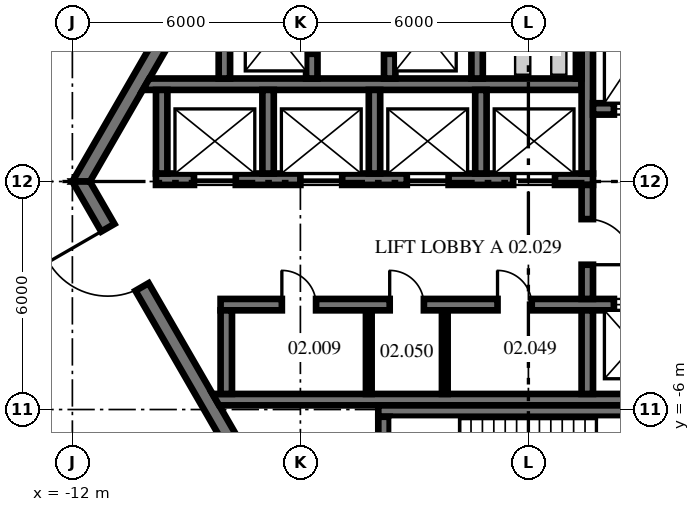
"""IFC4 building model, lengths in metres.
Left out: names, types, materials, properties, quantities, classifications, styles, units other than length and angle.
Written with IfcOpenShell. Run it as: python <this file> out.ifc"""

import sys

from ifc_helpers import new_model, si_unit, direction, frame, frame_2d, origin, place, context, subcontext, project, spatial, polyline, rectangle, outline, extrude, source, transform, mapped, element, fill, save


model = new_model("IFC4")
c1 = context("Model", 3, precision=1e-05, world=origin(), true_north=direction((0.0, 1.0)))
c2 = subcontext(c1, "Body", "Model", "MODEL_VIEW")
j1 = project(units=[si_unit("LENGTHUNIT", "METRE"), si_unit("PLANEANGLEUNIT", "RADIAN")], contexts=[c1])
p1 = place(None, origin())
s1 = spatial("IfcSite", under=j1, at=p1, CompositionType="ELEMENT")
p2 = place(p1, origin())
s2 = spatial("IfcBuilding", under=s1, at=p2, CompositionType="ELEMENT")
p3 = place(p2, frame((0.0, 0.0, 11.5)))
s3 = spatial("IfcBuildingStorey", under=s2, at=p3, CompositionType="ELEMENT", Elevation=11.5)
m1 = source(origin(), c2, "Body", "SweptSolid", [
    extrude(outline(polyline([(-0.115, -0.2), (11.885, -0.2), (11.654, 0.2), (0.115, 0.2), (-0.115, -0.2)])), origin(), (0.0, 0.0, 1.0), 4.3),
])
p4 = place(p3, frame((-5.885, 10.192, 0.0), z_axis=(0.0, 0.0, 1.0), x_axis=(-0.499996592174, -0.866027371285, 0.0)))
e1 = element("IfcWall", 1, at=p4, inside=s3, PredefinedType="SHEAR", context=c2, shape_type="MappedRepresentation", body=[
    mapped(m1, transform((0.0, 0.0, 0.0), scale=1.0)),
])
p5 = place(p4, frame((3.185, 0.0, 0.0)))
e2 = element("IfcOpeningElement", 2, at=p5, cuts=e1, PredefinedType="OPENING", context=c2, shape_type="SweptSolid", body=[
    extrude(rectangle(XDim=1.2, YDim=2.1, at=frame_2d((0.6, 1.05))), frame((0.0, 0.21, 0.0), z_axis=(0.0, -1.0, 0.0), x_axis=(1.0, 0.0, 0.0)), (0.0, 0.0, 1.0), 0.42),
])
p6 = place(p3, frame((-11.769, 0.0, 0.0), z_axis=(0.0, 0.0, 1.0), x_axis=(0.499996592174, -0.866027371285, 0.0)))
e3 = element("IfcWall", 3, at=p6, inside=s3, PredefinedType="SHEAR", context=c2, shape_type="MappedRepresentation", body=[
    mapped(m1, transform((0.0, 0.0, 0.0), scale=1.0)),
])
p7 = place(p6, frame((1.405, 0.0, 0.0)))
e4 = element("IfcOpeningElement", 4, at=p7, cuts=e3, PredefinedType="OPENING", context=c2, shape_type="SweptSolid", body=[
    extrude(rectangle(XDim=1.8, YDim=2.1, at=frame_2d((0.9, 1.05))), frame((0.0, 0.21, 0.0), z_axis=(0.0, -1.0, 0.0), x_axis=(1.0, 0.0, 0.0)), (0.0, 0.0, 1.0), 0.42),
])
p8 = place(p6, frame((7.915, 0.0, 0.0)))
e5 = element("IfcOpeningElement", 5, at=p8, cuts=e3, PredefinedType="OPENING", context=c2, shape_type="SweptSolid", body=[
    extrude(rectangle(XDim=1.2, YDim=2.1, at=frame_2d((0.6, 1.05))), frame((0.0, 0.21, 0.0), z_axis=(0.0, -1.0, 0.0), x_axis=(1.0, 0.0, 0.0)), (0.0, 0.0, 1.0), 0.42),
])
m2 = source(origin(), c2, "Body", "SweptSolid", [
    extrude(rectangle(XDim=11.5, YDim=0.3, at=frame_2d((5.75, 0.0))), origin(), (0.0, 0.0, 1.0), 4.3),
])
p9 = place(p3, frame((-9.8, 0.06, 0.0), z_axis=(0.0, 0.0, 1.0), x_axis=(1.0, 0.0, 0.0)))
e6 = element("IfcWall", 6, at=p9, inside=s3, PredefinedType="SHEAR", context=c2, shape_type="MappedRepresentation", body=[
    mapped(m2, transform((0.0, 0.0, 0.0), scale=1.0)),
])
p10 = place(p9, frame((1.0, 0.0, 0.0)))
e7 = element("IfcOpeningElement", 7, at=p10, cuts=e6, PredefinedType="OPENING", context=c2, shape_type="SweptSolid", body=[
    extrude(rectangle(XDim=1.1, YDim=2.1, at=frame_2d((0.55, 1.05))), frame((0.0, 0.16, 0.0), z_axis=(0.0, -1.0, 0.0), x_axis=(1.0, 0.0, 0.0)), (0.0, 0.0, 1.0), 0.32),
])
p11 = place(p9, frame((3.8, 0.0, 0.0)))
e8 = element("IfcOpeningElement", 8, at=p11, cuts=e6, PredefinedType="OPENING", context=c2, shape_type="SweptSolid", body=[
    extrude(rectangle(XDim=1.1, YDim=2.1, at=frame_2d((0.55, 1.05))), frame((0.0, 0.16, 0.0), z_axis=(0.0, -1.0, 0.0), x_axis=(1.0, 0.0, 0.0)), (0.0, 0.0, 1.0), 0.32),
])
p12 = place(p9, frame((6.6, 0.0, 0.0)))
e9 = element("IfcOpeningElement", 9, at=p12, cuts=e6, PredefinedType="OPENING", context=c2, shape_type="SweptSolid", body=[
    extrude(rectangle(XDim=1.1, YDim=2.1, at=frame_2d((0.55, 1.05))), frame((0.0, 0.16, 0.0), z_axis=(0.0, -1.0, 0.0), x_axis=(1.0, 0.0, 0.0)), (0.0, 0.0, 1.0), 0.32),
])
p13 = place(p9, frame((9.4, 0.0, 0.0)))
e10 = element("IfcOpeningElement", 10, at=p13, cuts=e6, PredefinedType="OPENING", context=c2, shape_type="SweptSolid", body=[
    extrude(rectangle(XDim=1.1, YDim=2.1, at=frame_2d((0.55, 1.05))), frame((0.0, 0.16, 0.0), z_axis=(0.0, -1.0, 0.0), x_axis=(1.0, 0.0, 0.0)), (0.0, 0.0, 1.0), 0.32),
])
m3 = source(origin(), c2, "Body", "SweptSolid", [
    extrude(outline(polyline([(11.2, -0.15), (-0.349, -0.15), (-0.176, 0.15), (11.2, 0.15), (11.2, -0.15)])), origin(), (0.0, 0.0, 1.0), 4.3),
])
p14 = place(p3, frame((-9.8, 2.56, 0.0), z_axis=(0.0, 0.0, 1.0), x_axis=(1.0, 0.0, 0.0)))
e11 = element("IfcWall", 11, at=p14, inside=s3, PredefinedType="SHEAR", context=c2, shape_type="MappedRepresentation", body=[
    mapped(m3, transform((0.0, 0.0, 0.0), scale=1.0)),
])
m4 = source(origin(), c2, "Body", "SweptSolid", [
    extrude(rectangle(XDim=4.45, YDim=0.3, at=frame_2d((2.225, 0.0))), origin(), (0.0, 0.0, 1.0), 4.3),
])
p15 = place(p3, frame((1.55, 0.21, 0.0), z_axis=(0.0, 0.0, 1.0), x_axis=(0.0, 1.0, 0.0)))
e12 = element("IfcWall", 12, at=p15, inside=s3, PredefinedType="SHEAR", context=c2, shape_type="MappedRepresentation", body=[
    mapped(m4, transform((0.0, 0.0, 0.0), scale=1.0)),
])
m5 = source(origin(), c2, "Body", "SweptSolid", [
    extrude(rectangle(XDim=3.0, YDim=0.3, at=frame_2d((1.5, 0.0))), origin(), (0.0, 0.0, 1.0), 4.3),
])
p16 = place(p3, frame((1.7, 1.91, 0.0), z_axis=(0.0, 0.0, 1.0), x_axis=(1.0, 0.0, 0.0)))
e13 = element("IfcWall", 13, at=p16, inside=s3, PredefinedType="SHEAR", context=c2, shape_type="MappedRepresentation", body=[
    mapped(m5, transform((0.0, 0.0, 0.0), scale=1.0)),
])
p17 = place(p16, frame((0.55, 0.0, 0.0)))
e14 = element("IfcOpeningElement", 14, at=p17, cuts=e13, PredefinedType="OPENING", context=c2, shape_type="SweptSolid", body=[
    extrude(rectangle(XDim=1.1, YDim=2.1, at=frame_2d((0.55, 1.05))), frame((0.0, 0.16, 0.0), z_axis=(0.0, -1.0, 0.0), x_axis=(1.0, 0.0, 0.0)), (0.0, 0.0, 1.0), 0.32),
])
m6 = source(origin(), c2, "Body", "SweptSolid", [
    extrude(rectangle(XDim=12.8, YDim=0.3, at=frame_2d((6.4, 0.0))), origin(), (0.0, 0.0, 1.0), 4.3),
])
p18 = place(p3, frame((-8.1, -3.24, 0.0), z_axis=(0.0, 0.0, 1.0), x_axis=(1.0, 0.0, 0.0)))
e15 = element("IfcWall", 15, at=p18, inside=s3, PredefinedType="SHEAR", context=c2, shape_type="MappedRepresentation", body=[
    mapped(m6, transform((0.0, 0.0, 0.0), scale=1.0)),
])
p19 = place(p18, frame((1.613, 0.0, 0.0)))
e16 = element("IfcOpeningElement", 16, at=p19, cuts=e15, PredefinedType="OPENING", context=c2, shape_type="SweptSolid", body=[
    extrude(rectangle(XDim=0.9, YDim=2.1, at=frame_2d((0.45, 1.05))), frame((0.0, 0.16, 0.0), z_axis=(0.0, -1.0, 0.0), x_axis=(1.0, 0.0, 0.0)), (0.0, 0.0, 1.0), 0.32),
])
p20 = place(p18, frame((4.45, 0.0, 0.0)))
e17 = element("IfcOpeningElement", 17, at=p20, cuts=e15, PredefinedType="OPENING", context=c2, shape_type="SweptSolid", body=[
    extrude(rectangle(XDim=0.9, YDim=2.1, at=frame_2d((0.45, 1.05))), frame((0.0, 0.16, 0.0), z_axis=(0.0, -1.0, 0.0), x_axis=(1.0, 0.0, 0.0)), (0.0, 0.0, 1.0), 0.32),
])
p21 = place(p18, frame((7.288, 0.0, 0.0)))
e18 = element("IfcOpeningElement", 18, at=p21, cuts=e15, PredefinedType="OPENING", context=c2, shape_type="SweptSolid", body=[
    extrude(rectangle(XDim=0.9, YDim=2.1, at=frame_2d((0.45, 1.05))), frame((0.0, 0.16, 0.0), z_axis=(0.0, -1.0, 0.0), x_axis=(1.0, 0.0, 0.0)), (0.0, 0.0, 1.0), 0.32),
])
p22 = place(p18, frame((10.35, 0.0, 0.0)))
e19 = element("IfcOpeningElement", 19, at=p22, cuts=e15, PredefinedType="OPENING", context=c2, shape_type="SweptSolid", body=[
    extrude(rectangle(XDim=1.1, YDim=2.1, at=frame_2d((0.55, 1.05))), frame((0.0, 0.16, 0.0), z_axis=(0.0, -1.0, 0.0), x_axis=(1.0, 0.0, 0.0)), (0.0, 0.0, 1.0), 0.32),
])
m7 = source(origin(), c2, "Body", "SweptSolid", [
    extrude(outline(polyline([(12.0, -0.15), (-0.04, -0.15), (-0.213, 0.15), (12.0, 0.15), (12.0, -0.15)])), origin(), (0.0, 0.0, 1.0), 4.3),
])
p23 = place(p3, frame((-8.1, -5.74, 0.0), z_axis=(0.0, 0.0, 1.0), x_axis=(1.0, 0.0, 0.0)))
e20 = element("IfcWall", 20, at=p23, inside=s3, PredefinedType="SHEAR", context=c2, shape_type="MappedRepresentation", body=[
    mapped(m7, transform((0.0, 0.0, 0.0), scale=1.0)),
])
m8 = source(origin(), c2, "Body", "SweptSolid", [
    extrude(rectangle(XDim=2.2, YDim=0.3, at=frame_2d((1.1, 0.0))), origin(), (0.0, 0.0, 1.0), 4.3),
])
p24 = place(p3, frame((-7.95, -5.59, 0.0), z_axis=(0.0, 0.0, 1.0), x_axis=(0.0, 1.0, 0.0)))
e21 = element("IfcWall", 21, at=p24, inside=s3, PredefinedType="SHEAR", context=c2, shape_type="MappedRepresentation", body=[
    mapped(m8, transform((0.0, 0.0, 0.0), scale=1.0)),
])
m9 = source(origin(), c2, "Body", "SweptSolid", [
    extrude(rectangle(XDim=2.2, YDim=0.3, at=frame_2d((1.1, 0.0))), origin(), (0.0, 0.0, 1.0), 4.3),
])
p25 = place(p3, frame((-9.65, 0.21, 0.0), z_axis=(0.0, 0.0, 1.0), x_axis=(0.0, 1.0, 0.0)))
e22 = element("IfcWall", 22, at=p25, inside=s3, PredefinedType="SHEAR", context=c2, shape_type="MappedRepresentation", body=[
    mapped(m9, transform((0.0, 0.0, 0.0), scale=1.0)),
])
p26 = place(p3, frame((1.55, -5.59, 0.0), z_axis=(0.0, 0.0, 1.0), x_axis=(0.0, 1.0, 0.0)))
e23 = element("IfcWall", 23, at=p26, inside=s3, PredefinedType="SHEAR", context=c2, shape_type="MappedRepresentation", body=[
    mapped(m8, transform((0.0, 0.0, 0.0), scale=1.0)),
])
p27 = place(p3, frame((1.55, -3.09, 0.0), z_axis=(0.0, 0.0, 1.0), x_axis=(0.0, 1.0, 0.0)))
e24 = element("IfcWall", 24, at=p27, inside=s3, PredefinedType="SHEAR", context=c2, shape_type="MappedRepresentation", body=[
    mapped(m5, transform((0.0, 0.0, 0.0), scale=1.0)),
])
p28 = place(p27, frame((0.9, 0.0, 0.0)))
e25 = element("IfcOpeningElement", 25, at=p28, cuts=e24, PredefinedType="OPENING", context=c2, shape_type="SweptSolid", body=[
    extrude(rectangle(XDim=1.2, YDim=2.1, at=frame_2d((0.6, 1.05))), frame((0.0, 0.16, 0.0), z_axis=(0.0, -1.0, 0.0), x_axis=(1.0, 0.0, 0.0)), (0.0, 0.0, 1.0), 0.32),
])
m10 = source(origin(), c2, "Body", "SweptSolid", [
    extrude(outline(polyline([(0.0, -0.15), (8.95, -0.15), (8.65, 0.15), (0.0, 0.15), (0.0, -0.15)])), origin(), (0.0, 0.0, 1.0), 4.3),
])
p29 = place(p3, frame((-3.95, -6.04, 0.0), z_axis=(0.0, 0.0, 1.0), x_axis=(1.0, 0.0, 0.0)))
e26 = element("IfcWall", 26, at=p29, inside=s3, PredefinedType="SHEAR", context=c2, shape_type="MappedRepresentation", body=[
    mapped(m10, transform((0.0, 0.0, 0.0), scale=1.0)),
])
m11 = source(origin(), c2, "Body", "SweptSolid", [
    extrude(outline(polyline([(3.8, -0.15), (-0.004, -0.15), (-0.004, 0.15), (3.8, 0.15), (3.8, -0.15)])), origin(), (0.0, 0.0, 1.0), 4.3),
])
p30 = place(p3, frame((-3.8, -9.99, 0.0), z_axis=(0.0, 0.0, 1.0), x_axis=(0.0, 1.0, 0.0)))
e27 = element("IfcWall", 27, at=p30, inside=s3, PredefinedType="SHEAR", context=c2, shape_type="MappedRepresentation", body=[
    mapped(m11, transform((0.0, 0.0, 0.0), scale=1.0)),
])
m12 = source(origin(), c2, "Body", "SweptSolid", [
    extrude(rectangle(XDim=2.4, YDim=0.3, at=frame_2d((1.2, 0.0))), origin(), (0.0, 0.0, 1.0), 4.3),
])
p31 = place(p3, frame((-8.0, 2.71, 0.0), z_axis=(0.0, 0.0, 1.0), x_axis=(0.0, 1.0, 0.0)))
e28 = element("IfcWall", 28, at=p31, inside=s3, PredefinedType="SHEAR", context=c2, shape_type="MappedRepresentation", body=[
    mapped(m12, transform((0.0, 0.0, 0.0), scale=1.0)),
])
p32 = place(p3, frame((-5.7, 2.71, 0.0), z_axis=(0.0, 0.0, 1.0), x_axis=(0.0, 1.0, 0.0)))
e29 = element("IfcWall", 29, at=p32, inside=s3, PredefinedType="SHEAR", context=c2, shape_type="MappedRepresentation", body=[
    mapped(m12, transform((0.0, 0.0, 0.0), scale=1.0)),
])
p33 = place(p32, frame((0.65, 0.0, 0.0)))
e30 = element("IfcOpeningElement", 30, at=p33, cuts=e29, PredefinedType="OPENING", context=c2, shape_type="SweptSolid", body=[
    extrude(rectangle(XDim=1.1, YDim=2.1, at=frame_2d((0.55, 1.05))), frame((0.0, 0.16, 0.0), z_axis=(0.0, -1.0, 0.0), x_axis=(1.0, 0.0, 0.0)), (0.0, 0.0, 1.0), 0.32),
])
p34 = place(p3, frame((-3.65, 2.71, 0.0), z_axis=(0.0, 0.0, 1.0), x_axis=(0.0, 1.0, 0.0)))
e31 = element("IfcWall", 31, at=p34, inside=s3, PredefinedType="SHEAR", context=c2, shape_type="MappedRepresentation", body=[
    mapped(m12, transform((0.0, 0.0, 0.0), scale=1.0)),
])
p35 = place(p34, frame((0.65, 0.0, 0.0)))
e32 = element("IfcOpeningElement", 32, at=p35, cuts=e31, PredefinedType="OPENING", context=c2, shape_type="SweptSolid", body=[
    extrude(rectangle(XDim=1.1, YDim=2.1, at=frame_2d((0.55, 1.05))), frame((0.0, 0.16, 0.0), z_axis=(0.0, -1.0, 0.0), x_axis=(1.0, 0.0, 0.0)), (0.0, 0.0, 1.0), 0.32),
])
p36 = place(p3, frame((-1.35, 2.71, 0.0), z_axis=(0.0, 0.0, 1.0), x_axis=(0.0, 1.0, 0.0)))
e33 = element("IfcWall", 33, at=p36, inside=s3, PredefinedType="SHEAR", context=c2, shape_type="MappedRepresentation", body=[
    mapped(m12, transform((0.0, 0.0, 0.0), scale=1.0)),
])
m13 = source(origin(), c2, "Body", "SweptSolid", [
    extrude(rectangle(XDim=3.18, YDim=0.15, at=frame_2d((1.59, 0.0))), origin(), (0.0, 0.0, 1.0), 4.3),
])
p37 = place(p3, frame((1.325, 2.71, 0.0), z_axis=(0.0, 0.0, 1.0), x_axis=(0.0, 1.0, 0.0)))
e34 = element("IfcWall", 34, at=p37, inside=s3, PredefinedType="PARTITIONING", context=c2, shape_type="MappedRepresentation", body=[
    mapped(m13, transform((0.0, 0.0, 0.0), scale=1.0)),
])
p38 = place(p37, frame((2.265, 0.0, 0.0)))
e35 = element("IfcOpeningElement", 35, at=p38, cuts=e34, PredefinedType="OPENING", context=c2, shape_type="SweptSolid", body=[
    extrude(rectangle(XDim=0.9, YDim=2.1, at=frame_2d((0.45, 1.05))), frame((0.0, 0.085, 0.0), z_axis=(0.0, -1.0, 0.0), x_axis=(1.0, 0.0, 0.0)), (0.0, 0.0, 1.0), 0.17),
])
for number, where, z_axis, x_axis in (
    (36, (-6.85, 0.21, 0.0), (0.0, 0.0, 1.0), (0.0, 1.0, 0.0)),
    (37, (-4.05, 0.21, 0.0), (0.0, 0.0, 1.0), (0.0, 1.0, 0.0)),
    (38, (-1.25, 0.21, 0.0), (0.0, 0.0, 1.0), (0.0, 1.0, 0.0)),
):
    element("IfcWall", number, at=place(p3, frame(where, z_axis=z_axis, x_axis=x_axis)), inside=s3, PredefinedType="SHEAR", context=c2, shape_type="MappedRepresentation", body=[
        mapped(m9, transform((0.0, 0.0, 0.0), scale=1.0)),
    ])
m14 = source(origin(), c2, "Body", "SweptSolid", [
    extrude(rectangle(XDim=2.2, YDim=0.15, at=frame_2d((1.1, 0.0))), origin(), (0.0, 0.0, 1.0), 4.3),
])
for number, where, z_axis, x_axis in (
    (39, (-4.2, -5.59, 0.0), (0.0, 0.0, 1.0), (0.0, 1.0, 0.0)),
    (40, (-2.2, -5.59, 0.0), (0.0, 0.0, 1.0), (0.0, 1.0, 0.0)),
):
    element("IfcWall", number, at=place(p3, frame(where, z_axis=z_axis, x_axis=x_axis)), inside=s3, PredefinedType="PARTITIONING", context=c2, shape_type="MappedRepresentation", body=[
        mapped(m14, transform((0.0, 0.0, 0.0), scale=1.0)),
    ])
p39 = place(p3, frame((-18.441, -0.043, 0.0), z_axis=(0.0, 0.0, 1.0), x_axis=(0.499994421829, -0.866028624319, 0.0)))
e41 = element("IfcWall", 41, at=p39, inside=s3, PredefinedType="PARTITIONING", context=c2, shape_type="SweptSolid", body=[
    extrude(rectangle(XDim=18.416, YDim=0.15, at=frame_2d((9.208, 0.0))), origin(), (0.0, 0.0, 1.0), 4.3),
])
p40 = place(p39, frame((3.602, 0.0, 0.0)))
e42 = element("IfcOpeningElement", 42, at=p40, cuts=e41, PredefinedType="OPENING", context=c2, shape_type="SweptSolid", body=[
    extrude(rectangle(XDim=1.8, YDim=2.4, at=frame_2d((0.9, 1.2))), frame((0.0, 0.085, 0.0), z_axis=(0.0, -1.0, 0.0), x_axis=(1.0, 0.0, 0.0)), (0.0, 0.0, 1.0), 0.17),
])
p41 = place(p39, frame((1.0, 0.0, 0.0)))
e43 = element("IfcOpeningElement", 43, at=p41, cuts=e41, PredefinedType="OPENING", context=c2, shape_type="SweptSolid", body=[
    extrude(rectangle(XDim=0.9, YDim=2.1, at=frame_2d((0.45, 1.05))), frame((0.0, 0.085, 0.0), z_axis=(0.0, -1.0, 0.0), x_axis=(1.0, 0.0, 0.0)), (0.0, 0.0, 1.0), 0.17),
])
p42 = place(p39, frame((7.031, 0.0, 0.0)))
e44 = element("IfcOpeningElement", 44, at=p42, cuts=e41, PredefinedType="OPENING", context=c2, shape_type="SweptSolid", body=[
    extrude(rectangle(XDim=0.9, YDim=2.1, at=frame_2d((0.45, 1.05))), frame((0.0, 0.085, 0.0), z_axis=(0.0, -1.0, 0.0), x_axis=(1.0, 0.0, 0.0)), (0.0, 0.0, 1.0), 0.17),
])
p43 = place(p39, frame((13.233, 0.0, 0.0)))
e45 = element("IfcOpeningElement", 45, at=p43, cuts=e41, PredefinedType="OPENING", context=c2, shape_type="SweptSolid", body=[
    extrude(rectangle(XDim=0.9, YDim=2.1, at=frame_2d((0.45, 1.05))), frame((0.0, 0.085, 0.0), z_axis=(0.0, -1.0, 0.0), x_axis=(1.0, 0.0, 0.0)), (0.0, 0.0, 1.0), 0.17),
])
p44 = place(p3, frame((-18.466, -0.0, 0.0), z_axis=(0.0, 0.0, 1.0), x_axis=(0.499989475653, 0.866031479934, 0.0)))
e46 = element("IfcWall", 46, at=p44, inside=s3, PredefinedType="PARTITIONING", context=c2, shape_type="SweptSolid", body=[
    extrude(rectangle(XDim=18.467, YDim=0.15, at=frame_2d((9.234, 0.0))), origin(), (0.0, 0.0, 1.0), 4.3),
])
p45 = place(p44, frame((12.391, 0.0, 0.0)))
e47 = element("IfcOpeningElement", 47, at=p45, cuts=e46, PredefinedType="OPENING", context=c2, shape_type="SweptSolid", body=[
    extrude(rectangle(XDim=1.8, YDim=2.4, at=frame_2d((0.9, 1.2))), frame((0.0, 0.085, 0.0), z_axis=(0.0, -1.0, 0.0), x_axis=(1.0, 0.0, 0.0)), (0.0, 0.0, 1.0), 0.17),
])
p46 = place(p44, frame((4.083, 0.0, 0.0)))
e48 = element("IfcOpeningElement", 48, at=p46, cuts=e46, PredefinedType="OPENING", context=c2, shape_type="SweptSolid", body=[
    extrude(rectangle(XDim=0.9, YDim=2.1, at=frame_2d((0.45, 1.05))), frame((0.0, 0.085, 0.0), z_axis=(0.0, -1.0, 0.0), x_axis=(1.0, 0.0, 0.0)), (0.0, 0.0, 1.0), 0.17),
])
p47 = place(p7, frame((1.8, 0.0, 0.0), z_axis=(0.0, 0.0, 1.0), x_axis=(-1.0, 0.0, 0.0)))
e49 = element("IfcDoor", 49, at=p47, inside=s3, OperationType="DOUBLE_DOOR_DOUBLE_SWING", PredefinedType="DOOR", context=c2, shape_type="SweptSolid", body=[
    extrude(rectangle(XDim=1.8, YDim=2.1, at=frame_2d((0.9, 1.05))), frame((0.0, 0.025, 0.0), z_axis=(0.0, -1.0, 0.0), x_axis=(1.0, 0.0, 0.0)), (0.0, 0.0, 1.0), 0.05),
])
fill(e4, e49)
p48 = place(p28, frame((1.2, 0.0, 0.0), z_axis=(0.0, 0.0, 1.0), x_axis=(-1.0, 0.0, 0.0)))
e50 = element("IfcDoor", 50, at=p48, inside=s3, OperationType="SINGLE_SWING_RIGHT", PredefinedType="DOOR", context=c2, shape_type="SweptSolid", body=[
    extrude(rectangle(XDim=1.2, YDim=2.1, at=frame_2d((0.6, 1.05))), frame((0.0, 0.025, 0.0), z_axis=(0.0, -1.0, 0.0), x_axis=(1.0, 0.0, 0.0)), (0.0, 0.0, 1.0), 0.05),
])
fill(e25, e50)
p49 = place(p19, origin())
e51 = element("IfcDoor", 51, at=p49, inside=s3, OperationType="SINGLE_SWING_LEFT", PredefinedType="DOOR", context=c2, shape_type="SweptSolid", body=[
    extrude(rectangle(XDim=0.9, YDim=2.1, at=frame_2d((0.45, 1.05))), frame((0.0, 0.025, 0.0), z_axis=(0.0, -1.0, 0.0), x_axis=(1.0, 0.0, 0.0)), (0.0, 0.0, 1.0), 0.05),
])
fill(e16, e51)
p50 = place(p20, origin())
e52 = element("IfcDoor", 52, at=p50, inside=s3, OperationType="SINGLE_SWING_LEFT", PredefinedType="DOOR", context=c2, shape_type="SweptSolid", body=[
    extrude(rectangle(XDim=0.9, YDim=2.1, at=frame_2d((0.45, 1.05))), frame((0.0, 0.025, 0.0), z_axis=(0.0, -1.0, 0.0), x_axis=(1.0, 0.0, 0.0)), (0.0, 0.0, 1.0), 0.05),
])
fill(e17, e52)
p51 = place(p21, origin())
e53 = element("IfcDoor", 53, at=p51, inside=s3, OperationType="SINGLE_SWING_LEFT", PredefinedType="DOOR", context=c2, shape_type="SweptSolid", body=[
    extrude(rectangle(XDim=0.9, YDim=2.1, at=frame_2d((0.45, 1.05))), frame((0.0, 0.025, 0.0), z_axis=(0.0, -1.0, 0.0), x_axis=(1.0, 0.0, 0.0)), (0.0, 0.0, 1.0), 0.05),
])
fill(e18, e53)
p52 = place(p10, origin())
e54 = element("IfcDoor", 54, at=p52, inside=s3, OperationType="DOUBLE_DOOR_SLIDING", PredefinedType="DOOR", context=c2, shape_type="SweptSolid", body=[
    extrude(rectangle(XDim=1.1, YDim=2.1, at=frame_2d((0.55, 1.05))), frame((0.0, 0.025, 0.0), z_axis=(0.0, -1.0, 0.0), x_axis=(1.0, 0.0, 0.0)), (0.0, 0.0, 1.0), 0.05),
])
fill(e7, e54)
p53 = place(p11, origin())
e55 = element("IfcDoor", 55, at=p53, inside=s3, OperationType="DOUBLE_DOOR_SLIDING", PredefinedType="DOOR", context=c2, shape_type="SweptSolid", body=[
    extrude(rectangle(XDim=1.1, YDim=2.1, at=frame_2d((0.55, 1.05))), frame((0.0, 0.025, 0.0), z_axis=(0.0, -1.0, 0.0), x_axis=(1.0, 0.0, 0.0)), (0.0, 0.0, 1.0), 0.05),
])
fill(e8, e55)
p54 = place(p12, origin())
e56 = element("IfcDoor", 56, at=p54, inside=s3, OperationType="DOUBLE_DOOR_SLIDING", PredefinedType="DOOR", context=c2, shape_type="SweptSolid", body=[
    extrude(rectangle(XDim=1.1, YDim=2.1, at=frame_2d((0.55, 1.05))), frame((0.0, 0.025, 0.0), z_axis=(0.0, -1.0, 0.0), x_axis=(1.0, 0.0, 0.0)), (0.0, 0.0, 1.0), 0.05),
])
fill(e9, e56)
p55 = place(p13, origin())
e57 = element("IfcDoor", 57, at=p55, inside=s3, OperationType="DOUBLE_DOOR_SLIDING", PredefinedType="DOOR", context=c2, shape_type="SweptSolid", body=[
    extrude(rectangle(XDim=1.1, YDim=2.1, at=frame_2d((0.55, 1.05))), frame((0.0, 0.025, 0.0), z_axis=(0.0, -1.0, 0.0), x_axis=(1.0, 0.0, 0.0)), (0.0, 0.0, 1.0), 0.05),
])
fill(e10, e57)
p56 = place(p17, origin())
e58 = element("IfcDoor", 58, at=p56, inside=s3, OperationType="DOUBLE_DOOR_SLIDING", PredefinedType="DOOR", context=c2, shape_type="SweptSolid", body=[
    extrude(rectangle(XDim=1.1, YDim=2.1, at=frame_2d((0.55, 1.05))), frame((0.0, 0.025, 0.0), z_axis=(0.0, -1.0, 0.0), x_axis=(1.0, 0.0, 0.0)), (0.0, 0.0, 1.0), 0.05),
])
fill(e14, e58)
p57 = place(p22, origin())
e59 = element("IfcDoor", 59, at=p57, inside=s3, OperationType="DOUBLE_DOOR_SLIDING", PredefinedType="DOOR", context=c2, shape_type="SweptSolid", body=[
    extrude(rectangle(XDim=1.1, YDim=2.1, at=frame_2d((0.55, 1.05))), frame((0.0, 0.025, 0.0), z_axis=(0.0, -1.0, 0.0), x_axis=(1.0, 0.0, 0.0)), (0.0, 0.0, 1.0), 0.05),
])
fill(e19, e59)
p58 = place(p33, origin())
e60 = element("IfcDoor", 60, at=p58, inside=s3, OperationType="DOUBLE_DOOR_SLIDING", PredefinedType="DOOR", context=c2, shape_type="SweptSolid", body=[
    extrude(rectangle(XDim=1.1, YDim=2.1, at=frame_2d((0.55, 1.05))), frame((0.0, 0.025, 0.0), z_axis=(0.0, -1.0, 0.0), x_axis=(1.0, 0.0, 0.0)), (0.0, 0.0, 1.0), 0.05),
])
fill(e30, e60)
p59 = place(p35, origin())
e61 = element("IfcDoor", 61, at=p59, inside=s3, OperationType="DOUBLE_DOOR_SLIDING", PredefinedType="DOOR", context=c2, shape_type="SweptSolid", body=[
    extrude(rectangle(XDim=1.1, YDim=2.1, at=frame_2d((0.55, 1.05))), frame((0.0, 0.025, 0.0), z_axis=(0.0, -1.0, 0.0), x_axis=(1.0, 0.0, 0.0)), (0.0, 0.0, 1.0), 0.05),
])
fill(e32, e61)
save(model, sys.argv[1])
